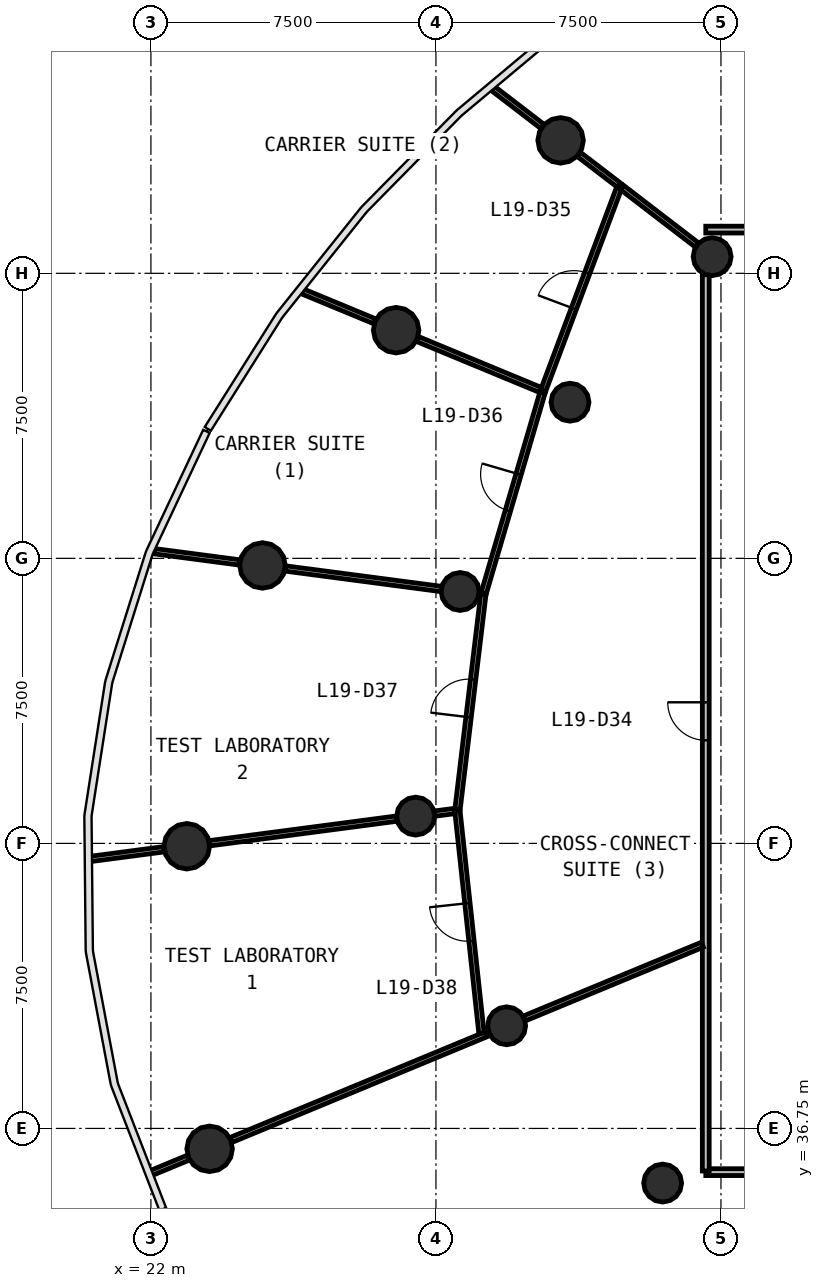
"""IFC4 building model, lengths in metres.
Left out: names, types, materials, properties, quantities, classifications, styles, units other than length and angle.
Written with IfcOpenShell. Run it as: python <this file> out.ifc"""

import sys

from ifc_helpers import new_model, si_unit, direction, frame, frame_2d, origin, origin_2d, place, context, subcontext, project, spatial, rectangle, circle, extrude, source, transform, mapped, element, fill, save


model = new_model("IFC4")
c1 = context("Model", 3, precision=1e-05, world=origin(), true_north=direction((0.0, 1.0)))
c2 = subcontext(c1, "Body", "Model", "MODEL_VIEW")
j1 = project(units=[si_unit("LENGTHUNIT", "METRE"), si_unit("PLANEANGLEUNIT", "RADIAN")], contexts=[c1])
p1 = place(None, origin())
s1 = spatial("IfcSite", under=j1, at=p1, CompositionType="ELEMENT")
p2 = place(p1, origin())
s2 = spatial("IfcBuilding", under=s1, at=p2, CompositionType="ELEMENT")
p3 = place(p2, frame((0.0, 0.0, 83.9)))
s3 = spatial("IfcBuildingStorey", under=s2, at=p3, CompositionType="ELEMENT", Elevation=83.9)
m1 = source(origin(), c2, "Body", "SweptSolid", [
    extrude(circle(Radius=0.6, at=origin_2d()), origin(), (0.0, 0.0, 1.0), 4.1),
])
for number, where, z_axis, x_axis in (
    (1, (32.78, 62.748, 0.0), (0.0, 0.0, 1.0), (1.0, 0.0, 0.0)),
    (2, (28.452, 57.754, 0.0), (0.0, 0.0, 1.0), (1.0, 0.0, 0.0)),
    (3, (24.936, 51.563, 0.0), (0.0, 0.0, 1.0), (1.0, 0.0, 0.0)),
    (4, (22.944, 44.175, 0.0), (0.0, 0.0, 1.0), (1.0, 0.0, 0.0)),
    (5, (23.544, 36.213, 0.0), (0.0, 0.0, 1.0), (1.0, 0.0, 0.0)),
):
    element("IfcColumn", number, at=place(p3, frame(where, z_axis=z_axis, x_axis=x_axis)), inside=s3, PredefinedType="COLUMN", context=c2, shape_type="MappedRepresentation", body=[
        mapped(m1, transform((0.0, 0.0, 0.0), scale=1.0)),
    ])
m2 = source(origin(), c2, "Body", "SweptSolid", [
    extrude(circle(Radius=0.5, at=origin_2d()), origin(), (0.0, 0.0, 1.0), 4.1),
])
for number, where, z_axis, x_axis in (
    (6, (36.768, 59.688, 0.0), (0.0, 0.0, 1.0), (1.0, 0.0, 0.0)),
    (7, (33.028, 55.859, 0.0), (0.0, 0.0, 1.0), (1.0, 0.0, 0.0)),
    (8, (30.137, 50.878, 0.0), (0.0, 0.0, 1.0), (1.0, 0.0, 0.0)),
    (9, (28.966, 44.968, 0.0), (0.0, 0.0, 1.0), (1.0, 0.0, 0.0)),
    (10, (31.361, 39.451, 0.0), (0.0, 0.0, 1.0), (1.0, 0.0, 0.0)),
    (11, (35.465, 35.312, 0.0), (0.0, 0.0, 1.0), (1.0, 0.0, 0.0)),
):
    element("IfcColumn", number, at=place(p3, frame(where, z_axis=z_axis, x_axis=x_axis)), inside=s3, PredefinedType="COLUMN", context=c2, shape_type="MappedRepresentation", body=[
        mapped(m2, transform((0.0, 0.0, 0.0), scale=1.0)),
    ])
p4 = place(p3, frame((67.4, 35.6, 0.0), z_axis=(0.0, 0.0, 1.0), x_axis=(-1.0, 0.0, 0.0)))
e12 = element("IfcWall", 12, at=p4, inside=s3, PredefinedType="PARTITIONING", context=c2, shape_type="SweptSolid", body=[
    extrude(rectangle(XDim=30.8, YDim=0.18, at=frame_2d((15.4, 0.0))), origin(), (0.0, 0.0, 1.0), 2.9),
])
p5 = place(p4, frame((20.95, 0.0, 0.0)))
e13 = element("IfcOpeningElement", 13, at=p5, cuts=e12, PredefinedType="OPENING", context=c2, shape_type="SweptSolid", body=[
    extrude(rectangle(XDim=1.0, YDim=2.1, at=frame_2d((0.5, 1.05))), frame((0.0, 0.1, 0.0), z_axis=(0.0, -1.0, 0.0), x_axis=(1.0, 0.0, 0.0)), (0.0, 0.0, 1.0), 0.2),
])
p6 = place(p4, frame((17.35, 0.0, 0.0)))
e14 = element("IfcOpeningElement", 14, at=p6, cuts=e12, PredefinedType="OPENING", context=c2, shape_type="SweptSolid", body=[
    extrude(rectangle(XDim=1.0, YDim=2.1, at=frame_2d((0.5, 1.05))), frame((0.0, 0.1, 0.0), z_axis=(0.0, -1.0, 0.0), x_axis=(1.0, 0.0, 0.0)), (0.0, 0.0, 1.0), 0.2),
])
p7 = place(p4, frame((14.95, 0.0, 0.0)))
e15 = element("IfcOpeningElement", 15, at=p7, cuts=e12, PredefinedType="OPENING", context=c2, shape_type="SweptSolid", body=[
    extrude(rectangle(XDim=1.0, YDim=2.1, at=frame_2d((0.5, 1.05))), frame((0.0, 0.1, 0.0), z_axis=(0.0, -1.0, 0.0), x_axis=(1.0, 0.0, 0.0)), (0.0, 0.0, 1.0), 0.2),
])
p8 = place(p3, frame((36.6, 60.4, 0.0), z_axis=(0.0, 0.0, 1.0), x_axis=(1.0, 0.0, 0.0)))
e16 = element("IfcWall", 16, at=p8, inside=s3, PredefinedType="PARTITIONING", context=c2, shape_type="SweptSolid", body=[
    extrude(rectangle(XDim=30.8, YDim=0.18, at=frame_2d((15.4, 0.0))), origin(), (0.0, 0.0, 1.0), 2.9),
])
p9 = place(p8, frame((27.45, 0.0, 0.0)))
e17 = element("IfcOpeningElement", 17, at=p9, cuts=e16, PredefinedType="OPENING", context=c2, shape_type="SweptSolid", body=[
    extrude(rectangle(XDim=0.9, YDim=2.1, at=frame_2d((0.45, 1.05))), frame((0.0, 0.1, 0.0), z_axis=(0.0, -1.0, 0.0), x_axis=(1.0, 0.0, 0.0)), (0.0, 0.0, 1.0), 0.2),
])
p10 = place(p8, frame((23.85, 0.0, 0.0)))
e18 = element("IfcOpeningElement", 18, at=p10, cuts=e16, PredefinedType="OPENING", context=c2, shape_type="SweptSolid", body=[
    extrude(rectangle(XDim=0.9, YDim=2.1, at=frame_2d((0.45, 1.05))), frame((0.0, 0.1, 0.0), z_axis=(0.0, -1.0, 0.0), x_axis=(1.0, 0.0, 0.0)), (0.0, 0.0, 1.0), 0.2),
])
p11 = place(p8, frame((20.85, 0.0, 0.0)))
e19 = element("IfcOpeningElement", 19, at=p11, cuts=e16, PredefinedType="OPENING", context=c2, shape_type="SweptSolid", body=[
    extrude(rectangle(XDim=0.9, YDim=2.1, at=frame_2d((0.45, 1.05))), frame((0.0, 0.1, 0.0), z_axis=(0.0, -1.0, 0.0), x_axis=(1.0, 0.0, 0.0)), (0.0, 0.0, 1.0), 0.2),
])
p12 = place(p8, frame((14.95, 0.0, 0.0)))
e20 = element("IfcOpeningElement", 20, at=p12, cuts=e16, PredefinedType="OPENING", context=c2, shape_type="SweptSolid", body=[
    extrude(rectangle(XDim=1.0, YDim=2.1, at=frame_2d((0.5, 1.05))), frame((0.0, 0.1, 0.0), z_axis=(0.0, -1.0, 0.0), x_axis=(1.0, 0.0, 0.0)), (0.0, 0.0, 1.0), 0.2),
])
p13 = place(p8, frame((12.55, 0.0, 0.0)))
e21 = element("IfcOpeningElement", 21, at=p13, cuts=e16, PredefinedType="OPENING", context=c2, shape_type="SweptSolid", body=[
    extrude(rectangle(XDim=1.0, YDim=2.1, at=frame_2d((0.5, 1.05))), frame((0.0, 0.1, 0.0), z_axis=(0.0, -1.0, 0.0), x_axis=(1.0, 0.0, 0.0)), (0.0, 0.0, 1.0), 0.2),
])
p14 = place(p8, frame((8.95, 0.0, 0.0)))
e22 = element("IfcOpeningElement", 22, at=p14, cuts=e16, PredefinedType="OPENING", context=c2, shape_type="SweptSolid", body=[
    extrude(rectangle(XDim=1.0, YDim=2.1, at=frame_2d((0.5, 1.05))), frame((0.0, 0.1, 0.0), z_axis=(0.0, -1.0, 0.0), x_axis=(1.0, 0.0, 0.0)), (0.0, 0.0, 1.0), 0.2),
])
p15 = place(p3, frame((36.6, 35.63, 0.0), z_axis=(0.0, 0.0, 1.0), x_axis=(0.0, 1.0, 0.0)))
e23 = element("IfcWall", 23, at=p15, inside=s3, PredefinedType="PARTITIONING", context=c2, shape_type="SweptSolid", body=[
    extrude(rectangle(XDim=23.583, YDim=0.18, at=frame_2d((11.791, 0.0))), origin(), (0.0, 0.0, 1.0), 2.9),
])
p16 = place(p15, frame((11.333, 0.0, 0.0)))
e24 = element("IfcOpeningElement", 24, at=p16, cuts=e23, PredefinedType="OPENING", context=c2, shape_type="SweptSolid", body=[
    extrude(rectangle(XDim=1.0, YDim=2.1, at=frame_2d((0.5, 1.05))), frame((0.0, 0.1, 0.0), z_axis=(0.0, -1.0, 0.0), x_axis=(1.0, 0.0, 0.0)), (0.0, 0.0, 1.0), 0.2),
])
p17 = place(p3, frame((24.104, 36.445, 0.0), z_axis=(0.0, 0.0, 1.0), x_axis=(0.923867037115, 0.382713597528, 0.0)))
e25 = element("IfcWall", 25, at=p17, inside=s3, PredefinedType="PARTITIONING", context=c2, shape_type="SweptSolid", body=[
    extrude(rectangle(XDim=7.35, YDim=0.14, at=frame_2d((3.675, 0.0))), origin(), (0.0, 0.0, 1.0), 2.9),
])
p18 = place(p3, frame((30.698, 39.252, 0.0), z_axis=(0.0, 0.0, 1.0), x_axis=(-0.107698733289, 0.99418357603, 0.0)))
e26 = element("IfcWall", 26, at=p18, inside=s3, PredefinedType="PARTITIONING", context=c2, shape_type="SweptSolid", body=[
    extrude(rectangle(XDim=5.894, YDim=0.14, at=frame_2d((2.947, 0.0))), origin(), (0.0, 0.0, 1.0), 2.9),
])
p19 = place(p18, frame((2.444, 0.0, 0.0)))
e27 = element("IfcOpeningElement", 27, at=p19, cuts=e26, PredefinedType="OPENING", context=c2, shape_type="SweptSolid", body=[
    extrude(rectangle(XDim=1.0, YDim=2.1, at=frame_2d((0.5, 1.05))), frame((0.0, 0.08, 0.0), z_axis=(0.0, -1.0, 0.0), x_axis=(1.0, 0.0, 0.0)), (0.0, 0.0, 1.0), 0.16),
])
p20 = place(p3, frame((32.316, 56.153, 0.0), z_axis=(0.0, 0.0, 1.0), x_axis=(0.35106774328, 0.936350062545, 0.0)))
e28 = element("IfcWall", 28, at=p20, inside=s3, PredefinedType="PARTITIONING", context=c2, shape_type="SweptSolid", body=[
    extrude(rectangle(XDim=5.764, YDim=0.14, at=frame_2d((2.882, 0.0))), origin(), (0.0, 0.0, 1.0), 2.9),
])
p21 = place(p20, frame((2.315, 0.0, 0.0)))
e29 = element("IfcOpeningElement", 29, at=p21, cuts=e28, PredefinedType="OPENING", context=c2, shape_type="SweptSolid", body=[
    extrude(rectangle(XDim=1.0, YDim=2.1, at=frame_2d((0.5, 1.05))), frame((0.0, 0.08, 0.0), z_axis=(0.0, -1.0, 0.0), x_axis=(1.0, 0.0, 0.0)), (0.0, 0.0, 1.0), 0.16),
])
p22 = place(p3, frame((30.067, 45.142, 0.0), z_axis=(0.0, 0.0, 1.0), x_axis=(0.119265199963, 0.992862433612, 0.0)))
e30 = element("IfcWall", 30, at=p22, inside=s3, PredefinedType="PARTITIONING", context=c2, shape_type="SweptSolid", body=[
    extrude(rectangle(XDim=5.697, YDim=0.14, at=frame_2d((2.849, 0.0))), origin(), (0.0, 0.0, 1.0), 2.9),
])
p23 = place(p22, frame((2.447, 0.0, 0.0)))
e31 = element("IfcOpeningElement", 31, at=p23, cuts=e30, PredefinedType="OPENING", context=c2, shape_type="SweptSolid", body=[
    extrude(rectangle(XDim=1.0, YDim=2.1, at=frame_2d((0.5, 1.05))), frame((0.0, 0.08, 0.0), z_axis=(0.0, -1.0, 0.0), x_axis=(1.0, 0.0, 0.0)), (0.0, 0.0, 1.0), 0.16),
])
p24 = place(p3, frame((30.755, 50.827, 0.0), z_axis=(0.0, 0.0, 1.0), x_axis=(0.281349777509, 0.959605284842, 0.0)))
e32 = element("IfcWall", 32, at=p24, inside=s3, PredefinedType="PARTITIONING", context=c2, shape_type="SweptSolid", body=[
    extrude(rectangle(XDim=5.521, YDim=0.14, at=frame_2d((2.76, 0.0))), origin(), (0.0, 0.0, 1.0), 2.9),
])
p25 = place(p24, frame((2.271, 0.0, 0.0)))
e33 = element("IfcOpeningElement", 33, at=p25, cuts=e32, PredefinedType="OPENING", context=c2, shape_type="SweptSolid", body=[
    extrude(rectangle(XDim=1.0, YDim=2.1, at=frame_2d((0.5, 1.05))), frame((0.0, 0.08, 0.0), z_axis=(0.0, -1.0, 0.0), x_axis=(1.0, 0.0, 0.0)), (0.0, 0.0, 1.0), 0.16),
])
p26 = place(p3, frame((31.827, 39.644, 0.0), z_axis=(0.0, 0.0, 1.0), x_axis=(0.923890025086, 0.382658100067, 0.0)))
e34 = element("IfcWall", 34, at=p26, inside=s3, PredefinedType="PARTITIONING", context=c2, shape_type="SweptSolid", body=[
    extrude(rectangle(XDim=5.068, YDim=0.14, at=frame_2d((2.534, 0.0))), origin(), (0.0, 0.0, 1.0), 2.9),
])
p27 = place(p3, frame((28.466, 44.902, 0.0), z_axis=(0.0, 0.0, 1.0), x_axis=(-0.991443414541, -0.130537181533, 0.0)))
e35 = element("IfcWall", 35, at=p27, inside=s3, PredefinedType="PARTITIONING", context=c2, shape_type="SweptSolid", body=[
    extrude(rectangle(XDim=4.966, YDim=0.14, at=frame_2d((2.483, 0.0))), origin(), (0.0, 0.0, 1.0), 2.9),
])
p28 = place(p3, frame((29.637, 50.944, 0.0), z_axis=(0.0, 0.0, 1.0), x_axis=(-0.991445054296, 0.130524726824, 0.0)))
e36 = element("IfcWall", 36, at=p28, inside=s3, PredefinedType="PARTITIONING", context=c2, shape_type="SweptSolid", body=[
    extrude(rectangle(XDim=4.137, YDim=0.14, at=frame_2d((2.069, 0.0))), origin(), (0.0, 0.0, 1.0), 2.9),
])
p29 = place(p3, frame((33.26, 62.38, 0.0), z_axis=(0.0, 0.0, 1.0), x_axis=(0.793352561574, -0.608762443851, 0.0)))
e37 = element("IfcWall", 37, at=p29, inside=s3, PredefinedType="PARTITIONING", context=c2, shape_type="SweptSolid", body=[
    extrude(rectangle(XDim=1.332, YDim=0.14, at=frame_2d((0.666, 0.0))), origin(), (0.0, 0.0, 1.0), 2.9),
])
p30 = place(p3, frame((34.398, 61.506, 0.0), z_axis=(0.0, 0.0, 1.0), x_axis=(0.793365666671, -0.608745364621, 0.0)))
e38 = element("IfcWall", 38, at=p30, inside=s3, PredefinedType="PARTITIONING", context=c2, shape_type="SweptSolid", body=[
    extrude(rectangle(XDim=2.482, YDim=0.14, at=frame_2d((1.241, 0.0))), origin(), (0.0, 0.0, 1.0), 2.9),
])
p31 = place(p3, frame((32.252, 56.18, 0.0), z_axis=(0.0, 0.0, 1.0), x_axis=(-0.923876003825, 0.382691951257, 0.0)))
e39 = element("IfcWall", 39, at=p31, inside=s3, PredefinedType="PARTITIONING", context=c2, shape_type="SweptSolid", body=[
    extrude(rectangle(XDim=3.508, YDim=0.14, at=frame_2d((1.754, 0.0))), origin(), (0.0, 0.0, 1.0), 2.9),
])
p32 = place(p3, frame((24.336, 51.642, 0.0), z_axis=(0.0, 0.0, 1.0), x_axis=(-0.991448788453, 0.130496359624, 0.0)))
e40 = element("IfcWall", 40, at=p32, inside=s3, PredefinedType="PARTITIONING", context=c2, shape_type="SweptSolid", body=[
    extrude(rectangle(XDim=2.264, YDim=0.14, at=frame_2d((1.132, 0.0))), origin(), (0.0, 0.0, 1.0), 2.9),
])
p33 = place(p3, frame((27.893, 57.985, 0.0), z_axis=(0.0, 0.0, 1.0), x_axis=(-0.923871471231, 0.382702893438, 0.0)))
e41 = element("IfcWall", 41, at=p33, inside=s3, PredefinedType="PARTITIONING", context=c2, shape_type="SweptSolid", body=[
    extrude(rectangle(XDim=2.068, YDim=0.14, at=frame_2d((1.034, 0.0))), origin(), (0.0, 0.0, 1.0), 2.9),
])
p34 = place(p3, frame((22.344, 44.096, 0.0), z_axis=(0.0, 0.0, 1.0), x_axis=(-0.991442855451, -0.130541427811, 0.0)))
e42 = element("IfcWall", 42, at=p34, inside=s3, PredefinedType="PARTITIONING", context=c2, shape_type="SweptSolid", body=[
    extrude(rectangle(XDim=1.962, YDim=0.14, at=frame_2d((0.981, 0.0))), origin(), (0.0, 0.0, 1.0), 2.9),
])
p35 = place(p3, frame((32.301, 63.116, 0.0), z_axis=(0.0, 0.0, 1.0), x_axis=(-0.793364464168, 0.608746931816, 0.0)))
e43 = element("IfcWall", 43, at=p35, inside=s3, PredefinedType="PARTITIONING", context=c2, shape_type="SweptSolid", body=[
    extrude(rectangle(XDim=1.641, YDim=0.14, at=frame_2d((0.821, 0.0))), origin(), (0.0, 0.0, 1.0), 2.9),
])
p36 = place(p3, frame((22.986, 35.982, 0.0), z_axis=(0.0, 0.0, 1.0), x_axis=(-0.923961481624, -0.382485529758, 0.0)))
e44 = element("IfcWall", 44, at=p36, inside=s3, PredefinedType="PARTITIONING", context=c2, shape_type="SweptSolid", body=[
    extrude(rectangle(XDim=1.075, YDim=0.14, at=frame_2d((0.538, 0.0))), origin(), (0.0, 0.0, 1.0), 2.9),
])
p37 = place(p3, frame((29.994, 45.103, 0.0), z_axis=(0.0, 0.0, 1.0), x_axis=(-0.991482368905, -0.130240977229, 0.0)))
e45 = element("IfcWall", 45, at=p37, inside=s3, PredefinedType="PARTITIONING", context=c2, shape_type="SweptSolid", body=[
    extrude(rectangle(XDim=0.532, YDim=0.14, at=frame_2d((0.266, 0.0))), origin(), (0.0, 0.0, 1.0), 2.9),
])
m3 = source(origin(), c2, "Body", "SweptSolid", [
    extrude(rectangle(XDim=1.0, YDim=2.1, at=frame_2d((0.5, 1.05))), frame((0.0, 0.025, 0.0), z_axis=(0.0, -1.0, 0.0), x_axis=(1.0, 0.0, 0.0)), (0.0, 0.0, 1.0), 0.05),
])
p38 = place(p16, origin())
e46 = element("IfcDoor", 46, at=p38, inside=s3, OperationType="SINGLE_SWING_RIGHT", PredefinedType="DOOR", context=c2, shape_type="MappedRepresentation", body=[
    mapped(m3, transform((0.0, 0.0, 0.0), scale=1.0)),
])
fill(e24, e46)
p39 = place(p21, origin())
e47 = element("IfcDoor", 47, at=p39, inside=s3, OperationType="SINGLE_SWING_LEFT", PredefinedType="DOOR", context=c2, shape_type="MappedRepresentation", body=[
    mapped(m3, transform((0.0, 0.0, 0.0), scale=1.0)),
])
fill(e29, e47)
p40 = place(p25, origin())
e48 = element("IfcDoor", 48, at=p40, inside=s3, OperationType="SINGLE_SWING_RIGHT", PredefinedType="DOOR", context=c2, shape_type="MappedRepresentation", body=[
    mapped(m3, transform((0.0, 0.0, 0.0), scale=1.0)),
])
fill(e33, e48)
p41 = place(p23, origin())
e49 = element("IfcDoor", 49, at=p41, inside=s3, OperationType="SINGLE_SWING_LEFT", PredefinedType="DOOR", context=c2, shape_type="MappedRepresentation", body=[
    mapped(m3, transform((0.0, 0.0, 0.0), scale=1.0)),
])
fill(e31, e49)
p42 = place(p19, origin())
e50 = element("IfcDoor", 50, at=p42, inside=s3, OperationType="SINGLE_SWING_RIGHT", PredefinedType="DOOR", context=c2, shape_type="MappedRepresentation", body=[
    mapped(m3, transform((0.0, 0.0, 0.0), scale=1.0)),
])
fill(e27, e50)
save(model, sys.argv[1])
